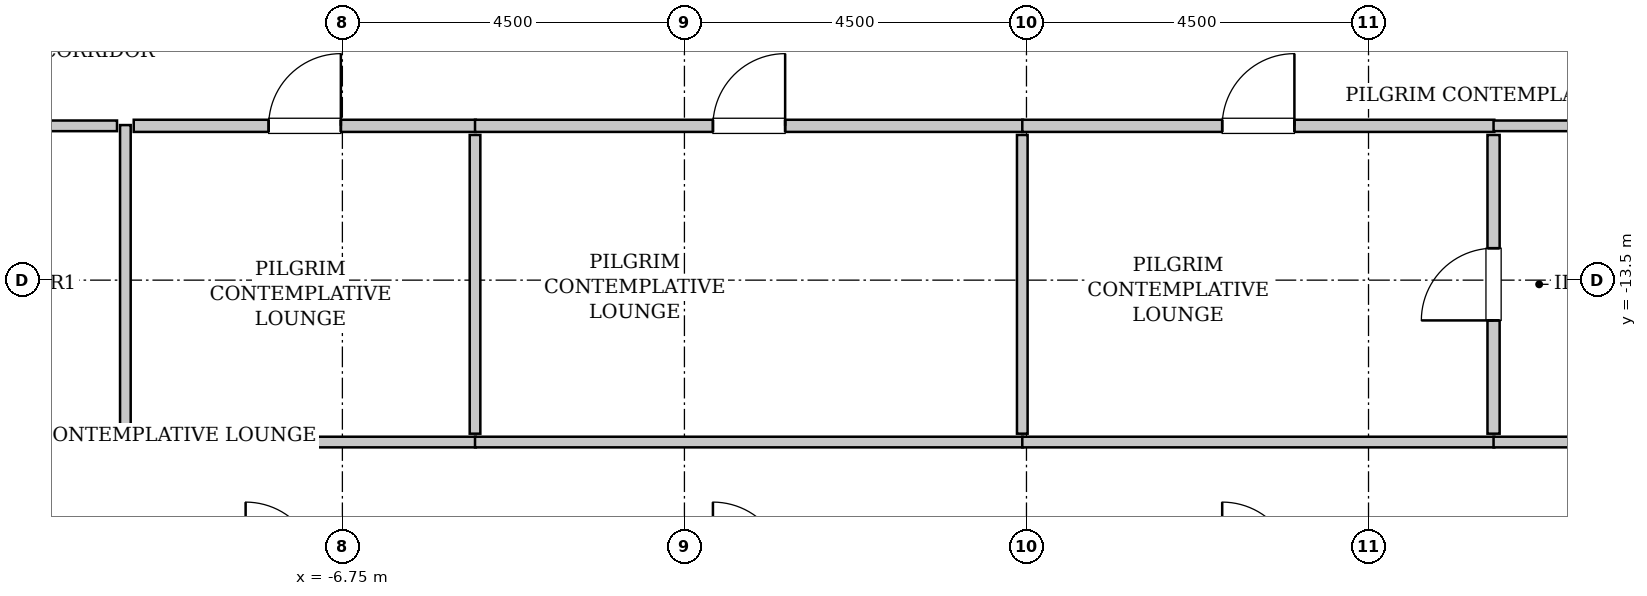
"""IFC4 building model, lengths in metres.
Left out: names, types, materials, properties, quantities, classifications, styles, units other than length and angle.
Written with IfcOpenShell. Run it as: python <this file> out.ifc"""

import sys

from ifc_helpers import new_model, si_unit, direction, frame, frame_2d, origin, place, context, subcontext, project, spatial, rectangle, extrude, source, transform, mapped, element, fill, save


model = new_model("IFC4")
c1 = context("Model", 3, precision=1e-05, world=origin(), true_north=direction((0.0, 1.0)))
c2 = subcontext(c1, "Body", "Model", "MODEL_VIEW")
j1 = project(units=[si_unit("LENGTHUNIT", "METRE"), si_unit("PLANEANGLEUNIT", "RADIAN")], contexts=[c1])
p1 = place(None, origin())
s1 = spatial("IfcSite", under=j1, at=p1, CompositionType="ELEMENT")
p2 = place(p1, origin())
s2 = spatial("IfcBuilding", under=s1, at=p2, CompositionType="ELEMENT")
p3 = place(p2, frame((0.0, 0.0, 229.4)))
s3 = spatial("IfcBuildingStorey", under=s2, at=p3, CompositionType="ELEMENT", Elevation=229.4)
m1 = source(origin(), c2, "Body", "SweptSolid", [
    extrude(rectangle(XDim=4.18, YDim=0.14, at=frame_2d((2.09, 0.0))), origin(), (0.0, 0.0, 1.0), 3.535),
])
p4 = place(p3, frame((-9.605, -15.64, 0.0), z_axis=(0.0, 0.0, 1.0), x_axis=(0.0, 1.0, 0.0)))
e1 = element("IfcWall", 1, at=p4, inside=s3, PredefinedType="PARTITIONING", context=c2, shape_type="MappedRepresentation", body=[
    mapped(m1, transform((0.0, 0.0, 0.0), x_axis=(1.0, 0.0, 0.0), y_axis=(0.0, 1.0, 0.0), z_axis=(0.0, 0.0, 1.0), scale=1.0)),
])
m2 = source(origin(), c2, "Body", "SweptSolid", [
    extrude(rectangle(XDim=2.165, YDim=0.14, at=frame_2d((1.083, 0.0))), origin(), (0.0, 0.0, 1.0), 3.535),
])
for number, where, z_axis, x_axis in (
    (2, (-11.88, -11.47, 0.0), (0.0, 0.0, 1.0), (1.0, 0.0, 0.0)),
    (3, (-11.88, -15.63, 0.0), (0.0, 0.0, 1.0), (1.0, 0.0, 0.0)),
):
    element("IfcWall", number, at=place(p3, frame(where, z_axis=z_axis, x_axis=x_axis)), inside=s3, PredefinedType="PARTITIONING", context=c2, shape_type="MappedRepresentation", body=[
        mapped(m2, transform((0.0, 0.0, 0.0), x_axis=(1.0, 0.0, 0.0), y_axis=(0.0, 1.0, 0.0), z_axis=(0.0, 0.0, 1.0), scale=1.0)),
    ])
m3 = source(origin(), c2, "Body", "SweptSolid", [
    extrude(rectangle(XDim=4.5, YDim=0.16, at=frame_2d((2.25, 0.0))), origin(), (0.0, 0.0, 1.0), 3.535),
])
p5 = place(p3, frame((-9.495, -11.47, 0.0), z_axis=(0.0, 0.0, 1.0), x_axis=(1.0, 0.0, 0.0)))
e4 = element("IfcWall", 4, at=p5, inside=s3, PredefinedType="PARTITIONING", context=c2, shape_type="MappedRepresentation", body=[
    mapped(m3, transform((0.0, 0.0, 0.0), x_axis=(1.0, 0.0, 0.0), y_axis=(0.0, 1.0, 0.0), z_axis=(0.0, 0.0, 1.0), scale=1.0)),
])
p6 = place(p5, frame((1.775, 0.0, 0.0)))
e5 = element("IfcOpeningElement", 5, at=p6, cuts=e4, PredefinedType="OPENING", context=c2, shape_type="SweptSolid", body=[
    extrude(rectangle(XDim=0.95, YDim=2.1, at=frame_2d((0.475, 1.05))), frame((0.0, 0.09, 0.0), z_axis=(0.0, -1.0, 0.0), x_axis=(1.0, 0.0, 0.0)), (0.0, 0.0, 1.0), 0.18),
])
m4 = source(origin(), c2, "Body", "SweptSolid", [
    extrude(rectangle(XDim=4.5, YDim=0.14, at=frame_2d((2.25, 0.0))), origin(), (0.0, 0.0, 1.0), 3.535),
])
p7 = place(p3, frame((-9.495, -15.63, 0.0), z_axis=(0.0, 0.0, 1.0), x_axis=(1.0, 0.0, 0.0)))
e6 = element("IfcWall", 6, at=p7, inside=s3, PredefinedType="PARTITIONING", context=c2, shape_type="MappedRepresentation", body=[
    mapped(m4, transform((0.0, 0.0, 0.0), x_axis=(1.0, 0.0, 0.0), y_axis=(0.0, 1.0, 0.0), z_axis=(0.0, 0.0, 1.0), scale=1.0)),
])
m5 = source(origin(), c2, "Body", "SweptSolid", [
    extrude(rectangle(XDim=3.93, YDim=0.14, at=frame_2d((1.965, 0.0))), origin(), (0.0, 0.0, 1.0), 3.535),
])
p8 = place(p3, frame((-5.005, -15.52, 0.0), z_axis=(0.0, 0.0, 1.0), x_axis=(0.0, 1.0, 0.0)))
e7 = element("IfcWall", 7, at=p8, inside=s3, PredefinedType="PARTITIONING", context=c2, shape_type="MappedRepresentation", body=[
    mapped(m5, transform((0.0, 0.0, 0.0), x_axis=(1.0, 0.0, 0.0), y_axis=(0.0, 1.0, 0.0), z_axis=(0.0, 0.0, 1.0), scale=1.0)),
])
m6 = source(origin(), c2, "Body", "SweptSolid", [
    extrude(rectangle(XDim=7.21, YDim=0.16, at=frame_2d((3.605, 0.0))), origin(), (0.0, 0.0, 1.0), 3.535),
])
p9 = place(p3, frame((-5.005, -11.47, 0.0), z_axis=(0.0, 0.0, 1.0), x_axis=(1.0, 0.0, 0.0)))
e8 = element("IfcWall", 8, at=p9, inside=s3, PredefinedType="PARTITIONING", context=c2, shape_type="MappedRepresentation", body=[
    mapped(m6, transform((0.0, 0.0, 0.0), x_axis=(1.0, 0.0, 0.0), y_axis=(0.0, 1.0, 0.0), z_axis=(0.0, 0.0, 1.0), scale=1.0)),
])
p10 = place(p9, frame((3.13, 0.0, 0.0)))
e9 = element("IfcOpeningElement", 9, at=p10, cuts=e8, PredefinedType="OPENING", context=c2, shape_type="SweptSolid", body=[
    extrude(rectangle(XDim=0.95, YDim=2.1, at=frame_2d((0.475, 1.05))), frame((0.0, 0.09, 0.0), z_axis=(0.0, -1.0, 0.0), x_axis=(1.0, 0.0, 0.0)), (0.0, 0.0, 1.0), 0.18),
])
m7 = source(origin(), c2, "Body", "SweptSolid", [
    extrude(rectangle(XDim=7.21, YDim=0.14, at=frame_2d((3.605, 0.0))), origin(), (0.0, 0.0, 1.0), 3.535),
])
p11 = place(p3, frame((-5.005, -15.63, 0.0), z_axis=(0.0, 0.0, 1.0), x_axis=(1.0, 0.0, 0.0)))
e10 = element("IfcWall", 10, at=p11, inside=s3, PredefinedType="PARTITIONING", context=c2, shape_type="MappedRepresentation", body=[
    mapped(m7, transform((0.0, 0.0, 0.0), x_axis=(1.0, 0.0, 0.0), y_axis=(0.0, 1.0, 0.0), z_axis=(0.0, 0.0, 1.0), scale=1.0)),
])
p12 = place(p3, frame((2.195, -15.52, 0.0), z_axis=(0.0, 0.0, 1.0), x_axis=(0.0, 1.0, 0.0)))
e11 = element("IfcWall", 11, at=p12, inside=s3, PredefinedType="PARTITIONING", context=c2, shape_type="MappedRepresentation", body=[
    mapped(m5, transform((0.0, 0.0, 0.0), x_axis=(1.0, 0.0, 0.0), y_axis=(0.0, 1.0, 0.0), z_axis=(0.0, 0.0, 1.0), scale=1.0)),
])
m8 = source(origin(), c2, "Body", "SweptSolid", [
    extrude(rectangle(XDim=6.21, YDim=0.16, at=frame_2d((3.105, 0.0))), origin(), (0.0, 0.0, 1.0), 3.535),
])
p13 = place(p3, frame((2.195, -11.47, 0.0), z_axis=(0.0, 0.0, 1.0), x_axis=(1.0, 0.0, 0.0)))
e12 = element("IfcWall", 12, at=p13, inside=s3, PredefinedType="PARTITIONING", context=c2, shape_type="MappedRepresentation", body=[
    mapped(m8, transform((0.0, 0.0, 0.0), x_axis=(1.0, 0.0, 0.0), y_axis=(0.0, 1.0, 0.0), z_axis=(0.0, 0.0, 1.0), scale=1.0)),
])
p14 = place(p13, frame((2.63, 0.0, 0.0)))
e13 = element("IfcOpeningElement", 13, at=p14, cuts=e12, PredefinedType="OPENING", context=c2, shape_type="SweptSolid", body=[
    extrude(rectangle(XDim=0.95, YDim=2.1, at=frame_2d((0.475, 1.05))), frame((0.0, 0.09, 0.0), z_axis=(0.0, -1.0, 0.0), x_axis=(1.0, 0.0, 0.0)), (0.0, 0.0, 1.0), 0.18),
])
m9 = source(origin(), c2, "Body", "SweptSolid", [
    extrude(rectangle(XDim=6.21, YDim=0.14, at=frame_2d((3.105, 0.0))), origin(), (0.0, 0.0, 1.0), 3.535),
])
p15 = place(p3, frame((2.195, -15.63, 0.0), z_axis=(0.0, 0.0, 1.0), x_axis=(1.0, 0.0, 0.0)))
e14 = element("IfcWall", 14, at=p15, inside=s3, PredefinedType="PARTITIONING", context=c2, shape_type="MappedRepresentation", body=[
    mapped(m9, transform((0.0, 0.0, 0.0), x_axis=(1.0, 0.0, 0.0), y_axis=(0.0, 1.0, 0.0), z_axis=(0.0, 0.0, 1.0), scale=1.0)),
])
m10 = source(origin(), c2, "Body", "SweptSolid", [
    extrude(rectangle(XDim=3.93, YDim=0.16, at=frame_2d((1.965, 0.0))), origin(), (0.0, 0.0, 1.0), 3.535),
])
p16 = place(p3, frame((8.395, -15.52, 0.0), z_axis=(0.0, 0.0, 1.0), x_axis=(0.0, 1.0, 0.0)))
e15 = element("IfcWall", 15, at=p16, inside=s3, PredefinedType="PARTITIONING", context=c2, shape_type="MappedRepresentation", body=[
    mapped(m10, transform((0.0, 0.0, 0.0), x_axis=(1.0, 0.0, 0.0), y_axis=(0.0, 1.0, 0.0), z_axis=(0.0, 0.0, 1.0), scale=1.0)),
])
p17 = place(p16, frame((1.49, 0.0, 0.0)))
e16 = element("IfcOpeningElement", 16, at=p17, cuts=e15, PredefinedType="OPENING", context=c2, shape_type="SweptSolid", body=[
    extrude(rectangle(XDim=0.95, YDim=2.1, at=frame_2d((0.475, 1.05))), frame((0.0, 0.09, 0.0), z_axis=(0.0, -1.0, 0.0), x_axis=(1.0, 0.0, 0.0)), (0.0, 0.0, 1.0), 0.18),
])
m11 = source(origin(), c2, "Body", "SweptSolid", [
    extrude(rectangle(XDim=3.495, YDim=0.14, at=frame_2d((1.748, 0.0))), origin(), (0.0, 0.0, 1.0), 3.535),
])
for number, where, z_axis, x_axis in (
    (17, (8.395, -11.47, 0.0), (0.0, 0.0, 1.0), (1.0, 0.0, 0.0)),
    (18, (8.395, -15.63, 0.0), (0.0, 0.0, 1.0), (1.0, 0.0, 0.0)),
):
    element("IfcWall", number, at=place(p3, frame(where, z_axis=z_axis, x_axis=x_axis)), inside=s3, PredefinedType="PARTITIONING", context=c2, shape_type="MappedRepresentation", body=[
        mapped(m11, transform((0.0, 0.0, 0.0), x_axis=(1.0, 0.0, 0.0), y_axis=(0.0, 1.0, 0.0), z_axis=(0.0, 0.0, 1.0), scale=1.0)),
    ])
m12 = source(origin(), c2, "Body", "SweptSolid", [
    extrude(rectangle(XDim=0.95, YDim=2.1, at=frame_2d((0.475, 1.05))), frame((0.0, 0.025, 0.0), z_axis=(0.0, -1.0, 0.0), x_axis=(1.0, 0.0, 0.0)), (0.0, 0.0, 1.0), 0.05),
])
p18 = place(p6, origin())
e19 = element("IfcDoor", 19, at=p18, inside=s3, OperationType="SINGLE_SWING_RIGHT", PredefinedType="DOOR", context=c2, shape_type="MappedRepresentation", body=[
    mapped(m12, transform((0.0, 0.0, 0.0), x_axis=(1.0, 0.0, 0.0), y_axis=(0.0, 1.0, 0.0), z_axis=(0.0, 0.0, 1.0), scale=1.0)),
])
fill(e5, e19)
p19 = place(p10, origin())
e20 = element("IfcDoor", 20, at=p19, inside=s3, OperationType="SINGLE_SWING_RIGHT", PredefinedType="DOOR", context=c2, shape_type="MappedRepresentation", body=[
    mapped(m12, transform((0.0, 0.0, 0.0), x_axis=(1.0, 0.0, 0.0), y_axis=(0.0, 1.0, 0.0), z_axis=(0.0, 0.0, 1.0), scale=1.0)),
])
fill(e9, e20)
p20 = place(p14, origin())
e21 = element("IfcDoor", 21, at=p20, inside=s3, OperationType="SINGLE_SWING_RIGHT", PredefinedType="DOOR", context=c2, shape_type="MappedRepresentation", body=[
    mapped(m12, transform((0.0, 0.0, 0.0), x_axis=(1.0, 0.0, 0.0), y_axis=(0.0, 1.0, 0.0), z_axis=(0.0, 0.0, 1.0), scale=1.0)),
])
fill(e13, e21)
p21 = place(p17, origin())
e22 = element("IfcDoor", 22, at=p21, inside=s3, OperationType="SINGLE_SWING_LEFT", PredefinedType="DOOR", context=c2, shape_type="MappedRepresentation", body=[
    mapped(m12, transform((0.0, 0.0, 0.0), x_axis=(1.0, 0.0, 0.0), y_axis=(0.0, 1.0, 0.0), z_axis=(0.0, 0.0, 1.0), scale=1.0)),
])
fill(e16, e22)
save(model, sys.argv[1])
